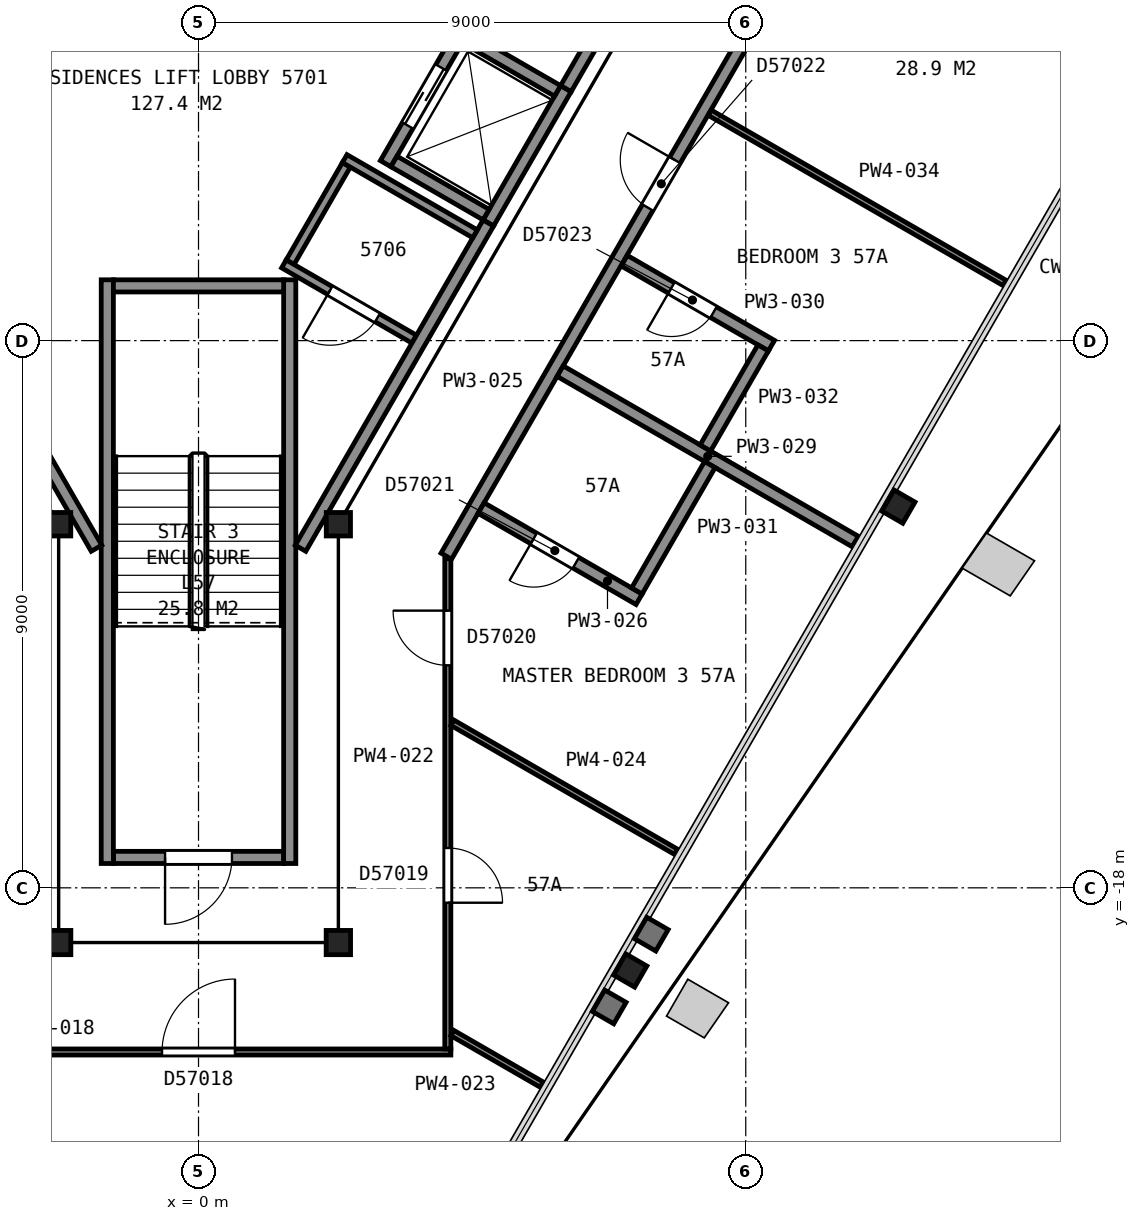
"""IFC4 building model, lengths in metres.
Left out: names, types, materials, properties, quantities, classifications, styles, units other than length and angle.
Written with IfcOpenShell. Run it as: python <this file> out.ifc"""

import sys

from ifc_helpers import new_model, si_unit, direction, frame, frame_2d, origin, origin_2d, place, context, subcontext, project, spatial, rectangle, i_section, extrude, element, fill, save


model = new_model("IFC4")
c1 = context("Model", 3, precision=1e-05, world=origin(), true_north=direction((0.0, 1.0)))
c2 = subcontext(c1, "Body", "Model", "MODEL_VIEW")
j1 = project(units=[si_unit("LENGTHUNIT", "METRE"), si_unit("PLANEANGLEUNIT", "RADIAN")], contexts=[c1])
p1 = place(None, origin())
s1 = spatial("IfcSite", under=j1, at=p1, CompositionType="ELEMENT")
p2 = place(p1, origin())
s2 = spatial("IfcBuilding", under=s1, at=p2, CompositionType="ELEMENT")
p3 = place(p2, frame((0.0, 0.0, 228.6)))
s3 = spatial("IfcBuildingStorey", under=s2, at=p3, CompositionType="ELEMENT", Elevation=228.6)
for number, where, z_axis, x_axis in (
    (1, (7.1, -19.36, 0.0), (0.0, 0.0, 1.0), (-0.5, -0.866, 0.0)),
    (2, (11.51, -11.73, 0.0), (0.0, 0.0, 1.0), (-0.5, -0.866, 0.0)),
):
    element("IfcColumn", number, at=place(p3, frame(where, z_axis=z_axis, x_axis=x_axis)), inside=s3, PredefinedType="COLUMN", context=c2, shape_type="SweptSolid", body=[
        extrude(i_section(OverallWidth=0.401, OverallDepth=0.399, WebThickness=0.025, FlangeThickness=0.04, FilletRadius=0.015, at=origin_2d()), origin(), (0.0, 0.0, 1.0), 3.665),
    ])
p4 = place(p3, frame((-2.3, -12.02, 0.0), z_axis=(0.0, 0.0, 1.0), x_axis=(1.0, 0.0, 0.0)))
e3 = element("IfcColumn", 3, at=p4, inside=s3, PredefinedType="COLUMN", context=c2, shape_type="SweptSolid", body=[
    extrude(i_section(OverallWidth=0.399, OverallDepth=0.386, WebThickness=0.021, FlangeThickness=0.033, FilletRadius=0.015, at=origin_2d()), origin(), (0.0, 0.0, 1.0), 3.7),
])
for number, where, z_axis, x_axis in (
    (4, (-2.3, -18.9, 0.0), (0.0, 0.0, 1.0), (-1.0, 0.0, 0.0)),
    (5, (2.3, -18.9, 0.0), (0.0, 0.0, 1.0), (-1.0, 0.0, 0.0)),
):
    element("IfcColumn", number, at=place(p3, frame(where, z_axis=z_axis, x_axis=x_axis)), inside=s3, PredefinedType="COLUMN", context=c2, shape_type="SweptSolid", body=[
        extrude(i_section(OverallWidth=0.401, OverallDepth=0.399, WebThickness=0.025, FlangeThickness=0.04, FilletRadius=0.015, at=origin_2d()), origin(), (0.0, 0.0, 1.0), 3.7),
    ])
p5 = place(p3, frame((2.3, -12.02, 0.0), z_axis=(0.0, 0.0, 1.0), x_axis=(1.0, 0.0, 0.0)))
e6 = element("IfcColumn", 6, at=p5, inside=s3, PredefinedType="COLUMN", context=c2, shape_type="SweptSolid", body=[
    extrude(i_section(OverallWidth=0.399, OverallDepth=0.386, WebThickness=0.021, FlangeThickness=0.033, FilletRadius=0.015, at=origin_2d()), origin(), (0.0, 0.0, 1.0), 3.7),
])
p6 = place(p3, frame((-1.4, -17.5, 0.0), z_axis=(0.0, 0.0, 1.0), x_axis=(1.0, 0.0, 0.0)))
e7 = element("IfcWall", 7, at=p6, inside=s3, PredefinedType="PARTITIONING", context=c2, shape_type="SweptSolid", body=[
    extrude(rectangle(XDim=2.8, YDim=0.2, at=frame_2d((1.4, 0.0))), origin(), (0.0, 0.0, 1.0), 3.45),
])
p7 = place(p6, frame((0.85, 0.0, 0.0)))
e8 = element("IfcOpeningElement", 8, at=p7, cuts=e7, PredefinedType="OPENING", context=c2, shape_type="SweptSolid", body=[
    extrude(rectangle(XDim=1.1, YDim=2.1, at=frame_2d((0.55, 1.05))), frame((0.0, 0.11, 0.0), z_axis=(0.0, -1.0, 0.0), x_axis=(1.0, 0.0, 0.0)), (0.0, 0.0, 1.0), 0.22),
])
for number, where, z_axis, x_axis in (
    (9, (1.5, -8.0, 0.0), (0.0, 0.0, 1.0), (0.0, -1.0, 0.0)),
    (10, (-1.5, -8.0, 0.0), (0.0, 0.0, 1.0), (0.0, -1.0, 0.0)),
):
    element("IfcWall", number, at=place(p3, frame(where, z_axis=z_axis, x_axis=x_axis)), inside=s3, PredefinedType="PARTITIONING", context=c2, shape_type="SweptSolid", body=[
        extrude(rectangle(XDim=9.6, YDim=0.2, at=frame_2d((4.8, 0.0))), origin(), (0.0, 0.0, 1.0), 3.45),
    ])
p8 = place(p3, frame((-1.4, -8.1, 0.0), z_axis=(0.0, 0.0, 1.0), x_axis=(1.0, 0.0, 0.0)))
e11 = element("IfcWall", 11, at=p8, inside=s3, PredefinedType="PARTITIONING", context=c2, shape_type="SweptSolid", body=[
    extrude(rectangle(XDim=2.8, YDim=0.2, at=frame_2d((1.4, 0.0))), origin(), (0.0, 0.0, 1.0), 3.45),
])
p9 = place(p3, frame((4.766, -7.065, 0.0), z_axis=(0.0, 0.0, 1.0), x_axis=(0.499948979701, 0.866054858364, 0.0)))
e12 = element("IfcWall", 12, at=p9, inside=s3, PredefinedType="PARTITIONING", context=c2, shape_type="SweptSolid", body=[
    extrude(rectangle(XDim=2.55, YDim=0.2, at=frame_2d((1.275, 0.0))), origin(), (0.0, 0.0, 1.0), 3.7),
])
p10 = place(p3, frame((3.077, -6.09, 0.0), z_axis=(0.0, 0.0, 1.0), x_axis=(0.500062241894, 0.865989465428, 0.0)))
e13 = element("IfcWall", 13, at=p10, inside=s3, PredefinedType="PARTITIONING", context=c2, shape_type="SweptSolid", body=[
    extrude(rectangle(XDim=2.55, YDim=0.2, at=frame_2d((1.275, 0.0))), origin(), (0.0, 0.0, 1.0), 3.7),
])
p11 = place(p10, frame((0.725, 0.0, 0.0)))
e14 = element("IfcOpeningElement", 14, at=p11, cuts=e13, PredefinedType="OPENING", context=c2, shape_type="SweptSolid", body=[
    extrude(rectangle(XDim=1.1, YDim=2.1, at=frame_2d((0.55, 1.05))), frame((0.0, 0.11, 0.0), z_axis=(0.0, -1.0, 0.0), x_axis=(1.0, 0.0, 0.0)), (0.0, 0.0, 1.0), 0.22),
])
p12 = place(p3, frame((5.905, -4.893, 0.0), z_axis=(0.0, 0.0, 1.0), x_axis=(-0.866002029911, 0.500040482552, 0.0)))
e15 = element("IfcWall", 15, at=p12, inside=s3, PredefinedType="PARTITIONING", context=c2, shape_type="SweptSolid", body=[
    extrude(rectangle(XDim=1.75, YDim=0.2, at=frame_2d((0.875, 0.0))), origin(), (0.0, 0.0, 1.0), 3.7),
])
p13 = place(p3, frame((4.73, -6.928, 0.0), z_axis=(0.0, 0.0, 1.0), x_axis=(-0.866036909293, 0.499980071345, 0.0)))
e16 = element("IfcWall", 16, at=p13, inside=s3, PredefinedType="PARTITIONING", context=c2, shape_type="SweptSolid", body=[
    extrude(rectangle(XDim=1.75, YDim=0.2, at=frame_2d((0.875, 0.0))), origin(), (0.0, 0.0, 1.0), 3.7),
])
p14 = place(p3, frame((-4.655, -7.257, 0.0), z_axis=(0.0, 0.0, 1.0), x_axis=(0.499966124405, -0.866044960985, 0.0)))
e17 = element("IfcWall", 17, at=p14, inside=s3, PredefinedType="PARTITIONING", context=c2, shape_type="SweptSolid", body=[
    extrude(rectangle(XDim=5.956, YDim=0.2, at=frame_2d((2.978, 0.0))), origin(), (0.0, 0.0, 1.0), 3.45),
])
p15 = place(p14, frame((0.45, 0.0, 0.0)))
e18 = element("IfcOpeningElement", 18, at=p15, cuts=e17, PredefinedType="OPENING", context=c2, shape_type="SweptSolid", body=[
    extrude(rectangle(XDim=1.8, YDim=2.1, at=frame_2d((0.9, 1.05))), frame((0.0, 0.11, 0.0), z_axis=(0.0, -1.0, 0.0), x_axis=(1.0, 0.0, 0.0)), (0.0, 0.0, 1.0), 0.22),
])
p16 = place(p3, frame((1.507, -7.711, 0.0), z_axis=(0.0, 0.0, 1.0), x_axis=(0.49994333299, 0.866058118026, 0.0)))
e19 = element("IfcWall", 19, at=p16, inside=s3, PredefinedType="PARTITIONING", context=c2, shape_type="SweptSolid", body=[
    extrude(rectangle(XDim=1.85, YDim=0.15, at=frame_2d((0.925, 0.0))), origin(), (0.0, 0.0, 1.0), 3.45),
])
p17 = place(p3, frame((1.404, -7.739, 0.0), z_axis=(0.0, 0.0, 1.0), x_axis=(0.866006523861, -0.500032699561, 0.0)))
e20 = element("IfcWall", 20, at=p17, inside=s3, PredefinedType="PARTITIONING", context=c2, shape_type="SweptSolid", body=[
    extrude(rectangle(XDim=2.475, YDim=0.15, at=frame_2d((1.237, 0.0))), origin(), (0.0, 0.0, 1.0), 3.45),
])
p18 = place(p17, frame((0.875, 0.0, 0.0)))
e21 = element("IfcOpeningElement", 21, at=p18, cuts=e20, PredefinedType="OPENING", context=c2, shape_type="SweptSolid", body=[
    extrude(rectangle(XDim=0.9, YDim=2.1, at=frame_2d((0.45, 1.05))), frame((0.0, 0.085, 0.0), z_axis=(0.0, -1.0, 0.0), x_axis=(1.0, 0.0, 0.0)), (0.0, 0.0, 1.0), 0.17),
])
p19 = place(p3, frame((1.677, -12.415, 0.0), z_axis=(0.0, 0.0, 1.0), x_axis=(0.500054337157, 0.865994029939, 0.0)))
e22 = element("IfcWall", 22, at=p19, inside=s3, PredefinedType="PARTITIONING", context=c2, shape_type="SweptSolid", body=[
    extrude(rectangle(XDim=6.177, YDim=0.2, at=frame_2d((3.088, 0.0))), origin(), (0.0, 0.0, 1.0), 3.45),
])
p20 = place(p3, frame((2.404, -6.007, 0.0), z_axis=(0.0, 0.0, 1.0), x_axis=(0.86604923931, -0.499958713387, 0.0)))
e23 = element("IfcWall", 23, at=p20, inside=s3, PredefinedType="PARTITIONING", context=c2, shape_type="SweptSolid", body=[
    extrude(rectangle(XDim=2.475, YDim=0.15, at=frame_2d((1.237, 0.0))), origin(), (0.0, 0.0, 1.0), 3.45),
])
p21 = place(p3, frame((6.042, -4.855, 0.0), z_axis=(0.0, 0.0, 1.0), x_axis=(0.500252727967, 0.865879442048, 0.0)))
e24 = element("IfcWall", 24, at=p21, inside=s3, PredefinedType="PARTITIONING", context=c2, shape_type="SweptSolid", body=[
    extrude(rectangle(XDim=2.617, YDim=0.2, at=frame_2d((1.309, 0.0))), origin(), (0.0, 0.0, 1.0), 3.45),
])
p22 = place(p3, frame((4.15, -20.7, 0.0), z_axis=(0.0, 0.0, 1.0), x_axis=(-1.0, 0.0, 0.0)))
e25 = element("IfcWall", 25, at=p22, inside=s3, PredefinedType="PARTITIONING", context=c2, shape_type="SweptSolid", body=[
    extrude(rectangle(XDim=8.3, YDim=0.1, at=frame_2d((4.15, 0.0))), origin(), (0.0, 0.0, 1.0), 2.713),
])
p23 = place(p22, frame((3.55, 0.0, 0.0)))
e26 = element("IfcOpeningElement", 26, at=p23, cuts=e25, PredefinedType="OPENING", context=c2, shape_type="SweptSolid", body=[
    extrude(rectangle(XDim=1.2, YDim=2.1, at=frame_2d((0.6, 1.05))), frame((0.0, 0.06, 0.0), z_axis=(0.0, -1.0, 0.0), x_axis=(1.0, 0.0, 0.0)), (0.0, 0.0, 1.0), 0.12),
])
p24 = place(p3, frame((4.1, -12.587, 0.0), z_axis=(0.0, 0.0, 1.0), x_axis=(0.0, -1.0, 0.0)))
e27 = element("IfcWall", 27, at=p24, inside=s3, PredefinedType="PARTITIONING", context=c2, shape_type="SweptSolid", body=[
    extrude(rectangle(XDim=8.063, YDim=0.1, at=frame_2d((4.031, 0.0))), origin(), (0.0, 0.0, 1.0), 2.713),
])
p25 = place(p24, frame((4.758, 0.0, 0.0)))
e28 = element("IfcOpeningElement", 28, at=p25, cuts=e27, PredefinedType="OPENING", context=c2, shape_type="SweptSolid", body=[
    extrude(rectangle(XDim=0.9, YDim=2.1, at=frame_2d((0.45, 1.05))), frame((0.0, 0.06, 0.0), z_axis=(0.0, -1.0, 0.0), x_axis=(1.0, 0.0, 0.0)), (0.0, 0.0, 1.0), 0.12),
])
p26 = place(p24, frame((0.854, 0.0, 0.0)))
e29 = element("IfcOpeningElement", 29, at=p26, cuts=e27, PredefinedType="OPENING", context=c2, shape_type="SweptSolid", body=[
    extrude(rectangle(XDim=0.9, YDim=2.1, at=frame_2d((0.45, 1.05))), frame((0.0, 0.06, 0.0), z_axis=(0.0, -1.0, 0.0), x_axis=(1.0, 0.0, 0.0)), (0.0, 0.0, 1.0), 0.12),
])
p27 = place(p3, frame((4.175, -20.388, 0.0), z_axis=(0.0, 0.0, 1.0), x_axis=(0.866046548355, -0.49996337474, 0.0)))
e30 = element("IfcWall", 30, at=p27, inside=s3, PredefinedType="PARTITIONING", context=c2, shape_type="SweptSolid", body=[
    extrude(rectangle(XDim=1.696, YDim=0.1, at=frame_2d((0.848, 0.0))), origin(), (0.0, 0.0, 1.0), 2.713),
])
p28 = place(p3, frame((4.175, -15.284, 0.0), z_axis=(0.0, 0.0, 1.0), x_axis=(0.86603819212, -0.4999778493, 0.0)))
e31 = element("IfcWall", 31, at=p28, inside=s3, PredefinedType="PARTITIONING", context=c2, shape_type="SweptSolid", body=[
    extrude(rectangle(XDim=4.248, YDim=0.1, at=frame_2d((2.124, 0.0))), origin(), (0.0, 0.0, 1.0), 2.713),
])
p29 = place(p3, frame((12.903, 2.745, 0.0), z_axis=(0.0, 0.0, 1.0), x_axis=(-0.499999743747, -0.866025551732, 0.0)))
e32 = element("IfcWall", 32, at=p29, inside=s3, PredefinedType="PARTITIONING", context=c2, shape_type="SweptSolid", body=[
    extrude(rectangle(XDim=17.656, YDim=0.2, at=frame_2d((8.828, 0.0))), origin(), (0.0, 0.0, 1.0), 2.713),
])
p30 = place(p29, frame((10.134, 0.0, 0.0)))
e33 = element("IfcOpeningElement", 33, at=p30, cuts=e32, PredefinedType="OPENING", context=c2, shape_type="SweptSolid", body=[
    extrude(rectangle(XDim=0.9, YDim=2.1, at=frame_2d((0.45, 1.05))), frame((0.0, 0.11, 0.0), z_axis=(0.0, -1.0, 0.0), x_axis=(1.0, 0.0, 0.0)), (0.0, 0.0, 1.0), 0.22),
])
p31 = place(p29, frame((6.073, 0.0, 0.0)))
e34 = element("IfcOpeningElement", 34, at=p31, cuts=e32, PredefinedType="OPENING", context=c2, shape_type="SweptSolid", body=[
    extrude(rectangle(XDim=0.9, YDim=2.1, at=frame_2d((0.45, 1.05))), frame((0.0, 0.11, 0.0), z_axis=(0.0, -1.0, 0.0), x_axis=(1.0, 0.0, 0.0)), (0.0, 0.0, 1.0), 0.22),
])
p32 = place(p3, frame((4.648, -11.754, 0.0), z_axis=(0.0, 0.0, 1.0), x_axis=(0.866010750942, -0.50002537861, 0.0)))
e35 = element("IfcWall", 35, at=p32, inside=s3, PredefinedType="PARTITIONING", context=c2, shape_type="SweptSolid", body=[
    extrude(rectangle(XDim=3.0, YDim=0.2, at=frame_2d((1.5, 0.0))), origin(), (0.0, 0.0, 1.0), 2.713),
])
p33 = place(p32, frame((1.0, 0.0, 0.0)))
e36 = element("IfcOpeningElement", 36, at=p33, cuts=e35, PredefinedType="OPENING", context=c2, shape_type="SweptSolid", body=[
    extrude(rectangle(XDim=0.8, YDim=2.1, at=frame_2d((0.4, 1.05))), frame((0.0, 0.11, 0.0), z_axis=(0.0, -1.0, 0.0), x_axis=(1.0, 0.0, 0.0)), (0.0, 0.0, 1.0), 0.22),
])
p34 = place(p3, frame((5.948, -9.502, 0.0), z_axis=(0.0, 0.0, 1.0), x_axis=(0.866028157966, -0.499995229588, 0.0)))
e37 = element("IfcWall", 37, at=p34, inside=s3, PredefinedType="PARTITIONING", context=c2, shape_type="SweptSolid", body=[
    extrude(rectangle(XDim=5.604, YDim=0.2, at=frame_2d((2.802, 0.0))), origin(), (0.0, 0.0, 1.0), 2.713),
])
p35 = place(p3, frame((9.423, -9.083, 0.0), z_axis=(0.0, 0.0, 1.0), x_axis=(-0.866041588165, 0.499971966783, 0.0)))
e38 = element("IfcWall", 38, at=p35, inside=s3, PredefinedType="PARTITIONING", context=c2, shape_type="SweptSolid", body=[
    extrude(rectangle(XDim=2.795, YDim=0.2, at=frame_2d((1.397, 0.0))), origin(), (0.0, 0.0, 1.0), 2.713),
])
p36 = place(p35, frame((1.1, 0.0, 0.0)))
e39 = element("IfcOpeningElement", 39, at=p36, cuts=e38, PredefinedType="OPENING", context=c2, shape_type="SweptSolid", body=[
    extrude(rectangle(XDim=0.8, YDim=2.1, at=frame_2d((0.4, 1.05))), frame((0.0, 0.11, 0.0), z_axis=(0.0, -1.0, 0.0), x_axis=(1.0, 0.0, 0.0)), (0.0, 0.0, 1.0), 0.22),
])
p37 = place(p3, frame((7.209, -13.117, 0.0), z_axis=(0.0, 0.0, 1.0), x_axis=(0.499913221443, 0.866075499611, 0.0)))
e40 = element("IfcWall", 40, at=p37, inside=s3, PredefinedType="PARTITIONING", context=c2, shape_type="SweptSolid", body=[
    extrude(rectangle(XDim=2.4, YDim=0.2, at=frame_2d((1.2, 0.0))), origin(), (0.0, 0.0, 1.0), 2.713),
])
p38 = place(p3, frame((8.336, -10.765, 0.0), z_axis=(0.0, 0.0, 1.0), x_axis=(0.499911523785, 0.866076479525, 0.0)))
e41 = element("IfcWall", 41, at=p38, inside=s3, PredefinedType="PARTITIONING", context=c2, shape_type="SweptSolid", body=[
    extrude(rectangle(XDim=1.9, YDim=0.2, at=frame_2d((0.95, 0.0))), origin(), (0.0, 0.0, 1.0), 2.713),
])
p39 = place(p3, frame((8.407, -5.251, 0.0), z_axis=(0.0, 0.0, 1.0), x_axis=(0.866061432277, -0.499937591627, 0.0)))
e42 = element("IfcWall", 42, at=p39, inside=s3, PredefinedType="PARTITIONING", context=c2, shape_type="SweptSolid", body=[
    extrude(rectangle(XDim=5.599, YDim=0.1, at=frame_2d((2.8, 0.0))), origin(), (0.0, 0.0, 1.0), 2.713),
])
p40 = place(p7, origin())
e43 = element("IfcDoor", 43, at=p40, inside=s3, OperationType="SINGLE_SWING_LEFT", PredefinedType="DOOR", context=c2, shape_type="SweptSolid", body=[
    extrude(rectangle(XDim=1.1, YDim=2.1, at=frame_2d((0.55, 1.05))), frame((0.0, 0.025, 0.0), z_axis=(0.0, -1.0, 0.0), x_axis=(1.0, 0.0, 0.0)), (0.0, 0.0, 1.0), 0.05),
])
fill(e8, e43)
p41 = place(p11, origin())
e44 = element("IfcDoor", 44, at=p41, inside=s3, OperationType="SLIDING_TO_LEFT", PredefinedType="DOOR", context=c2, shape_type="SweptSolid", body=[
    extrude(rectangle(XDim=1.1, YDim=2.1, at=frame_2d((0.55, 1.05))), frame((0.0, 0.025, 0.0), z_axis=(0.0, -1.0, 0.0), x_axis=(1.0, 0.0, 0.0)), (0.0, 0.0, 1.0), 0.05),
])
fill(e14, e44)
p42 = place(p18, origin())
e45 = element("IfcDoor", 45, at=p42, inside=s3, OperationType="SINGLE_SWING_LEFT", PredefinedType="DOOR", context=c2, shape_type="SweptSolid", body=[
    extrude(rectangle(XDim=0.9, YDim=2.1, at=frame_2d((0.45, 1.05))), frame((0.0, 0.025, 0.0), z_axis=(0.0, -1.0, 0.0), x_axis=(1.0, 0.0, 0.0)), (0.0, 0.0, 1.0), 0.05),
])
fill(e21, e45)
p43 = place(p23, origin())
e46 = element("IfcDoor", 46, at=p43, inside=s3, OperationType="SINGLE_SWING_LEFT", PredefinedType="DOOR", context=c2, shape_type="SweptSolid", body=[
    extrude(rectangle(XDim=1.2, YDim=2.1, at=frame_2d((0.6, 1.05))), frame((0.0, 0.025, 0.0), z_axis=(0.0, -1.0, 0.0), x_axis=(1.0, 0.0, 0.0)), (0.0, 0.0, 1.0), 0.05),
])
fill(e26, e46)
p44 = place(p25, origin())
e47 = element("IfcDoor", 47, at=p44, inside=s3, OperationType="SINGLE_SWING_RIGHT", PredefinedType="DOOR", context=c2, shape_type="SweptSolid", body=[
    extrude(rectangle(XDim=0.9, YDim=2.1, at=frame_2d((0.45, 1.05))), frame((0.0, 0.025, 0.0), z_axis=(0.0, -1.0, 0.0), x_axis=(1.0, 0.0, 0.0)), (0.0, 0.0, 1.0), 0.05),
])
fill(e28, e47)
p45 = place(p26, origin())
e48 = element("IfcDoor", 48, at=p45, inside=s3, OperationType="SINGLE_SWING_LEFT", PredefinedType="DOOR", context=c2, shape_type="SweptSolid", body=[
    extrude(rectangle(XDim=0.9, YDim=2.1, at=frame_2d((0.45, 1.05))), frame((0.0, 0.025, 0.0), z_axis=(0.0, -1.0, 0.0), x_axis=(1.0, 0.0, 0.0)), (0.0, 0.0, 1.0), 0.05),
])
fill(e29, e48)
p46 = place(p30, origin())
e49 = element("IfcDoor", 49, at=p46, inside=s3, OperationType="SINGLE_SWING_LEFT", PredefinedType="DOOR", context=c2, shape_type="SweptSolid", body=[
    extrude(rectangle(XDim=0.9, YDim=2.1, at=frame_2d((0.45, 1.05))), frame((0.0, 0.025, 0.0), z_axis=(0.0, -1.0, 0.0), x_axis=(1.0, 0.0, 0.0)), (0.0, 0.0, 1.0), 0.05),
])
fill(e33, e49)
p47 = place(p33, origin())
e50 = element("IfcDoor", 50, at=p47, inside=s3, OperationType="SINGLE_SWING_LEFT", PredefinedType="DOOR", context=c2, shape_type="SweptSolid", body=[
    extrude(rectangle(XDim=0.8, YDim=2.1, at=frame_2d((0.4, 1.05))), frame((0.0, 0.025, 0.0), z_axis=(0.0, -1.0, 0.0), x_axis=(1.0, 0.0, 0.0)), (0.0, 0.0, 1.0), 0.05),
])
fill(e36, e50)
p48 = place(p36, origin())
e51 = element("IfcDoor", 51, at=p48, inside=s3, OperationType="SINGLE_SWING_RIGHT", PredefinedType="DOOR", context=c2, shape_type="SweptSolid", body=[
    extrude(rectangle(XDim=0.8, YDim=2.1, at=frame_2d((0.4, 1.05))), frame((0.0, 0.025, 0.0), z_axis=(0.0, -1.0, 0.0), x_axis=(1.0, 0.0, 0.0)), (0.0, 0.0, 1.0), 0.05),
])
fill(e39, e51)
save(model, sys.argv[1])
